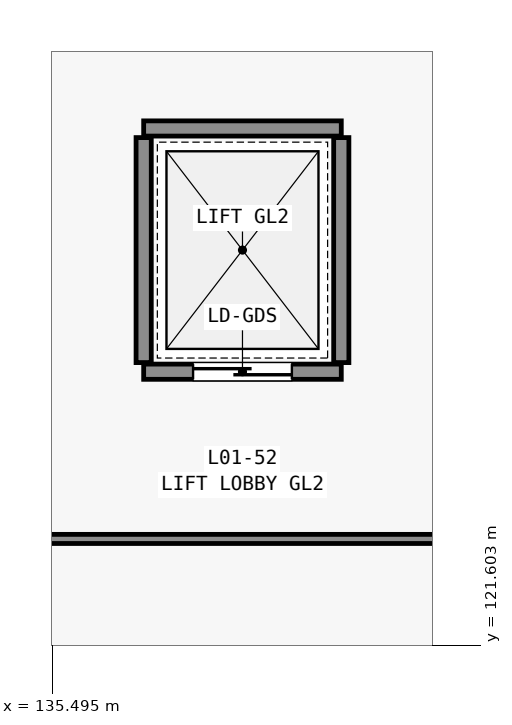
"""IFC4 building model, lengths in metres.
Left out: names, types, materials, properties, quantities, classifications, styles, units other than length and angle.
Written with IfcOpenShell. Run it as: python <this file> out.ifc"""

import sys

from ifc_helpers import new_model, si_unit, direction, frame, frame_2d, origin, place, context, subcontext, project, spatial, rectangle, extrude, element, fill, save


model = new_model("IFC4")
c1 = context("Model", 3, precision=1e-05, world=origin(), true_north=direction((0.0, 1.0)))
c2 = subcontext(c1, "Body", "Model", "MODEL_VIEW")
j1 = project(units=[si_unit("LENGTHUNIT", "METRE"), si_unit("PLANEANGLEUNIT", "RADIAN")], contexts=[c1])
p1 = place(None, origin())
s1 = spatial("IfcSite", under=j1, at=p1, CompositionType="ELEMENT")
p2 = place(p1, origin())
s2 = spatial("IfcBuilding", under=s1, at=p2, CompositionType="ELEMENT")
p3 = place(p2, frame((0.0, 0.0, 6.0)))
s3 = spatial("IfcBuildingStorey", under=s2, at=p3, CompositionType="ELEMENT", Elevation=6.0)
p4 = place(p3, frame((136.7, 125.2, 0.0), z_axis=(0.0, 0.0, 1.0), x_axis=(1.0, 0.0, 0.0)))
e1 = element("IfcWall", 1, at=p4, inside=s3, PredefinedType="STANDARD", context=c2, shape_type="SweptSolid", body=[
    extrude(rectangle(XDim=2.6, YDim=0.2, at=frame_2d((1.3, 0.0))), origin(), (0.0, 0.0, 1.0), 5.04),
])
p5 = place(p4, frame((0.65, 0.0, 0.0)))
e2 = element("IfcOpeningElement", 2, at=p5, cuts=e1, PredefinedType="OPENING", context=c2, shape_type="SweptSolid", body=[
    extrude(rectangle(XDim=1.3, YDim=2.15, at=frame_2d((0.65, 1.075))), frame((0.0, 0.11, 0.0), z_axis=(0.0, -1.0, 0.0), x_axis=(1.0, 0.0, 0.0)), (0.0, 0.0, 1.0), 0.22),
])
p6 = place(p3, frame((136.7, 128.4, 0.0), z_axis=(0.0, 0.0, 1.0), x_axis=(1.0, 0.0, 0.0)))
e3 = element("IfcWall", 3, at=p6, inside=s3, PredefinedType="STANDARD", context=c2, shape_type="SweptSolid", body=[
    extrude(rectangle(XDim=2.6, YDim=0.2, at=frame_2d((1.3, 0.0))), origin(), (0.0, 0.0, 1.0), 5.04),
])
for number, where, z_axis, x_axis in (
    (4, (136.7, 125.32, 0.0), (0.0, 0.0, 1.0), (0.0, 1.0, 0.0)),
    (5, (139.3, 125.32, 0.0), (0.0, 0.0, 1.0), (0.0, 1.0, 0.0)),
):
    element("IfcWall", number, at=place(p3, frame(where, z_axis=z_axis, x_axis=x_axis)), inside=s3, PredefinedType="STANDARD", context=c2, shape_type="SweptSolid", body=[
        extrude(rectangle(XDim=2.96, YDim=0.2, at=frame_2d((1.48, 0.0))), origin(), (0.0, 0.0, 1.0), 5.04),
    ])
p7 = place(p3, frame((111.5, 123.0, 0.0), z_axis=(0.0, 0.0, 1.0), x_axis=(1.0, 0.0, 0.0)))
e6 = element("IfcWall", 6, at=p7, inside=s3, PredefinedType="PARTITIONING", context=c2, shape_type="SweptSolid", body=[
    extrude(rectangle(XDim=32.5, YDim=0.12, at=frame_2d((16.25, 0.0))), origin(), (0.0, 0.0, 1.0), 4.428),
])
p8 = place(p5, origin())
e7 = element("IfcDoor", 7, at=p8, inside=s3, OperationType="SLIDING_TO_LEFT", PredefinedType="DOOR", context=c2, shape_type="SweptSolid", body=[
    extrude(rectangle(XDim=1.3, YDim=2.15, at=frame_2d((0.65, 1.075))), frame((0.0, 0.025, 0.0), z_axis=(0.0, -1.0, 0.0), x_axis=(1.0, 0.0, 0.0)), (0.0, 0.0, 1.0), 0.05),
])
fill(e2, e7)
save(model, sys.argv[1])
